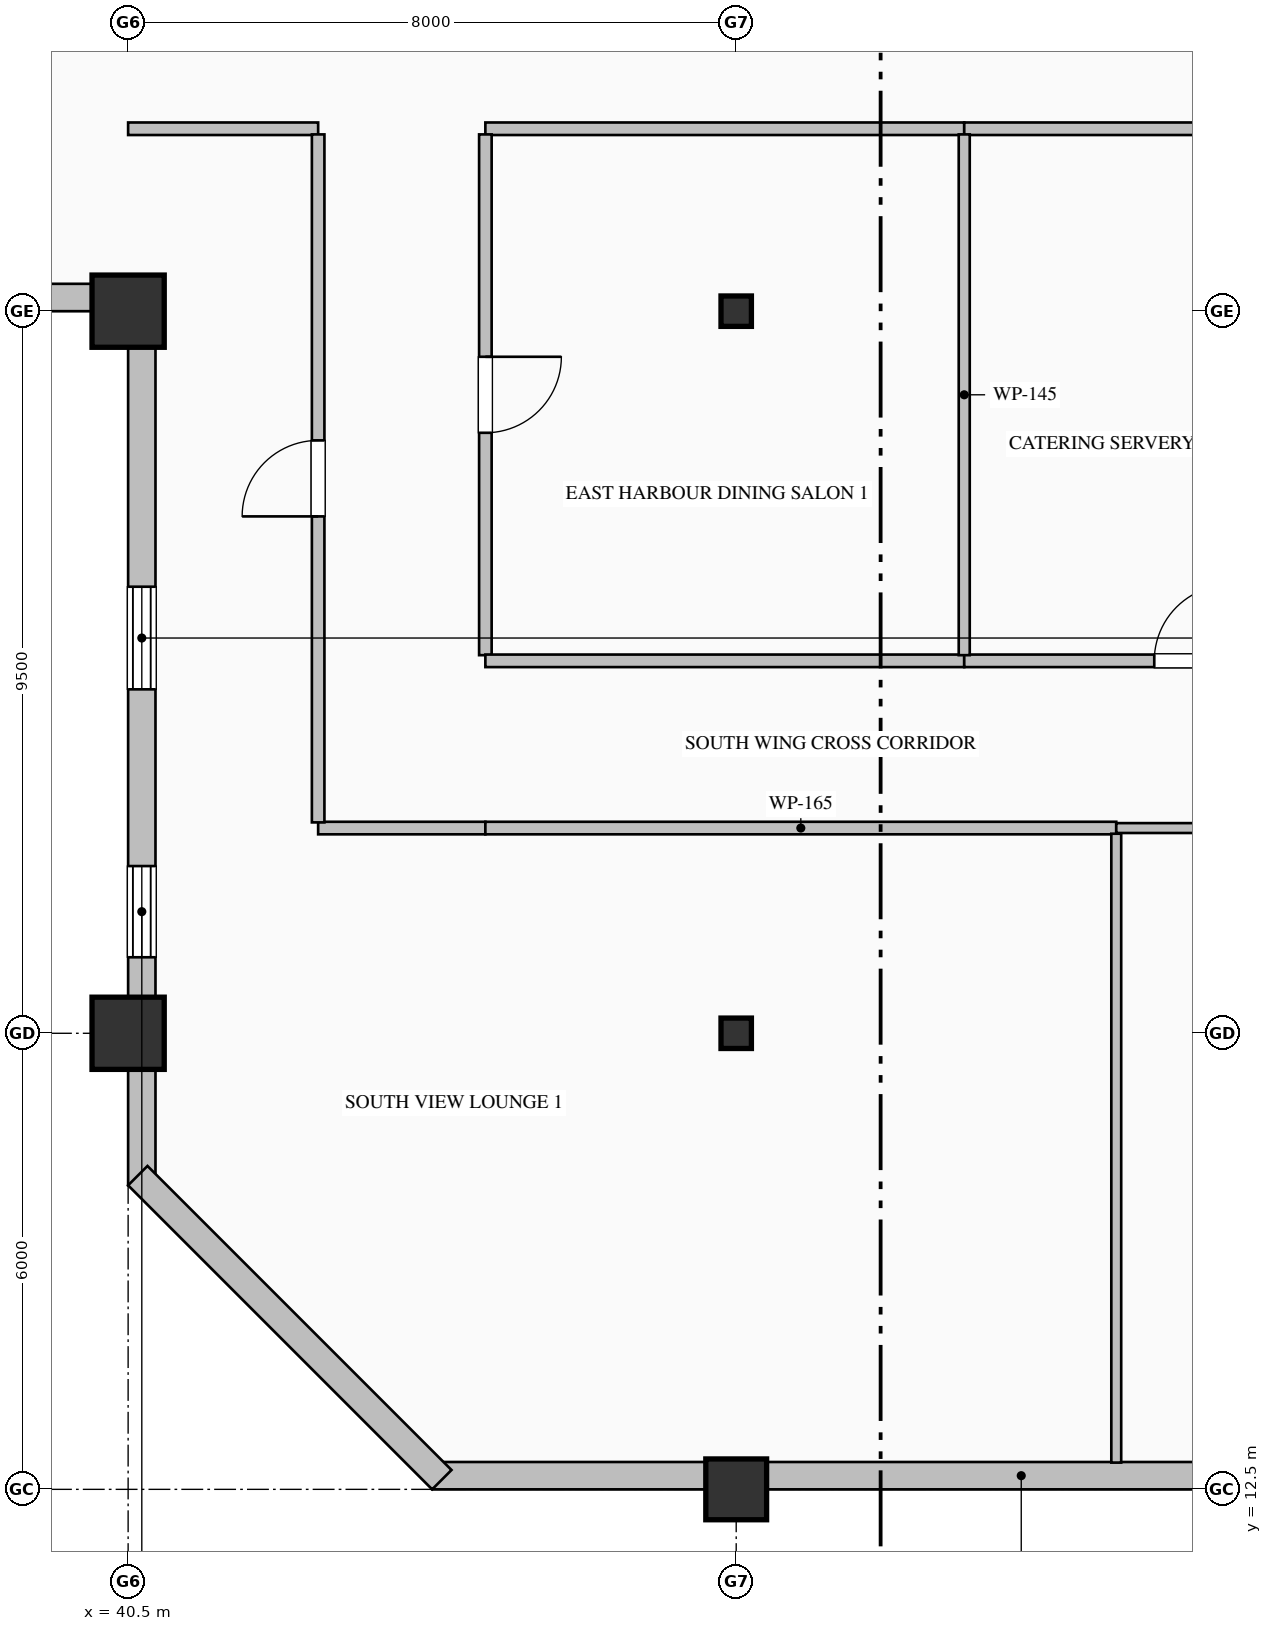
"""IFC4 building model, lengths in metres.
Left out: names, types, materials, properties, quantities, classifications, styles, units other than length and angle.
Written with IfcOpenShell. Run it as: python <this file> out.ifc"""

import sys

from ifc_helpers import new_model, si_unit, direction, frame, frame_2d, origin, origin_2d, place, context, subcontext, project, spatial, rectangle, hollow_rectangle, i_section, extrude, element, fill, save


model = new_model("IFC4")
c1 = context("Model", 3, precision=1e-05, world=origin(), true_north=direction((0.0, 1.0)))
c2 = subcontext(c1, "Body", "Model", "MODEL_VIEW")
j1 = project(units=[si_unit("LENGTHUNIT", "METRE"), si_unit("PLANEANGLEUNIT", "RADIAN")], contexts=[c1])
p1 = place(None, origin())
s1 = spatial("IfcSite", under=j1, at=p1, CompositionType="ELEMENT")
p2 = place(p1, origin())
s2 = spatial("IfcBuilding", under=s1, at=p2, CompositionType="ELEMENT")
p3 = place(p2, frame((0.0, 0.0, 249.8)))
s3 = spatial("IfcBuildingStorey", under=s2, at=p3, CompositionType="ELEMENT", Elevation=249.8)
for number, where, z_axis, x_axis in (
    (1, (40.5, 18.5, 0.0), (0.0, 0.0, 1.0), (1.0, 0.0, 0.0)),
    (2, (40.5, 28.0, 0.0), (0.0, 0.0, 1.0), (1.0, 0.0, 0.0)),
):
    element("IfcColumn", number, at=place(p3, frame(where, z_axis=z_axis, x_axis=x_axis)), inside=s3, PredefinedType="COLUMN", context=c2, shape_type="SweptSolid", body=[
        extrude(hollow_rectangle(XDim=0.95, YDim=0.95, WallThickness=0.036, at=origin_2d()), origin(), (0.0, 0.0, 1.0), 4.0),
    ])
p4 = place(p3, frame((48.5, 12.5, 0.0), z_axis=(0.0, 0.0, 1.0), x_axis=(1.0, 0.0, 0.0)))
e3 = element("IfcColumn", 3, at=p4, inside=s3, PredefinedType="COLUMN", context=c2, shape_type="SweptSolid", body=[
    extrude(hollow_rectangle(XDim=0.8, YDim=0.8, WallThickness=0.032, at=origin_2d()), origin(), (0.0, 0.0, 1.0), 4.0),
])
for number, where, z_axis, x_axis in (
    (4, (48.5, 18.5, 0.0), (0.0, 0.0, 1.0), (1.0, 0.0, 0.0)),
    (5, (48.5, 28.0, 0.0), (0.0, 0.0, 1.0), (1.0, 0.0, 0.0)),
):
    element("IfcColumn", number, at=place(p3, frame(where, z_axis=z_axis, x_axis=x_axis)), inside=s3, PredefinedType="COLUMN", context=c2, shape_type="SweptSolid", body=[
        extrude(i_section(OverallWidth=0.4, OverallDepth=0.4, WebThickness=0.013, FlangeThickness=0.021, FilletRadius=0.022, at=origin_2d()), origin(), (0.0, 0.0, 1.0), 4.0),
    ])
p5 = place(p3, frame((40.68, 16.5, 0.0), z_axis=(0.0, 0.0, 1.0), x_axis=(0.0, 1.0, 0.0)))
e6 = element("IfcWall", 6, at=p5, inside=s3, PredefinedType="SOLIDWALL", context=c2, shape_type="SweptSolid", body=[
    extrude(rectangle(XDim=11.86, YDim=0.36, at=frame_2d((5.93, 0.0))), origin(), (0.0, 0.0, 1.0), 3.187),
])
p6 = place(p5, frame((3.0, 0.0, 0.9)))
e7 = element("IfcOpeningElement", 7, at=p6, cuts=e6, PredefinedType="OPENING", context=c2, shape_type="SweptSolid", body=[
    extrude(rectangle(XDim=1.2, YDim=1.85, at=frame_2d((0.6, 0.925))), frame((0.0, 0.19, 0.0), z_axis=(0.0, -1.0, 0.0), x_axis=(1.0, 0.0, 0.0)), (0.0, 0.0, 1.0), 0.38),
])
p7 = place(p5, frame((6.525, 0.0, 0.9)))
e8 = element("IfcOpeningElement", 8, at=p7, cuts=e6, PredefinedType="OPENING", context=c2, shape_type="SweptSolid", body=[
    extrude(rectangle(XDim=1.35, YDim=1.85, at=frame_2d((0.675, 0.925))), frame((0.0, 0.19, 0.0), z_axis=(0.0, -1.0, 0.0), x_axis=(1.0, 0.0, 0.0)), (0.0, 0.0, 1.0), 0.38),
])
p8 = place(p3, frame((40.52, 28.18, 0.0), z_axis=(0.0, 0.0, 1.0), x_axis=(-1.0, 0.0, 0.0)))
e9 = element("IfcWall", 9, at=p8, inside=s3, PredefinedType="SOLIDWALL", context=c2, shape_type="SweptSolid", body=[
    extrude(rectangle(XDim=27.52, YDim=0.36, at=frame_2d((13.76, 0.0))), origin(), (0.0, 0.0, 1.0), 3.187),
])
p9 = place(p8, frame((10.2, 0.0, 0.9)))
e10 = element("IfcOpeningElement", 10, at=p9, cuts=e9, PredefinedType="OPENING", context=c2, shape_type="SweptSolid", body=[
    extrude(rectangle(XDim=1.2, YDim=1.85, at=frame_2d((0.6, 0.925))), frame((0.0, 0.19, 0.0), z_axis=(0.0, -1.0, 0.0), x_axis=(1.0, 0.0, 0.0)), (0.0, 0.0, 1.0), 0.38),
])
p10 = place(p8, frame((13.725, 0.0, 0.9)))
e11 = element("IfcOpeningElement", 11, at=p10, cuts=e9, PredefinedType="OPENING", context=c2, shape_type="SweptSolid", body=[
    extrude(rectangle(XDim=1.35, YDim=1.85, at=frame_2d((0.675, 0.925))), frame((0.0, 0.19, 0.0), z_axis=(0.0, -1.0, 0.0), x_axis=(1.0, 0.0, 0.0)), (0.0, 0.0, 1.0), 0.38),
])
p11 = place(p8, frame((17.4, 0.0, 0.7)))
e12 = element("IfcOpeningElement", 12, at=p11, cuts=e9, PredefinedType="OPENING", context=c2, shape_type="SweptSolid", body=[
    extrude(rectangle(XDim=1.2, YDim=1.85, at=frame_2d((0.6, 0.925))), frame((0.0, 0.19, 0.0), z_axis=(0.0, -1.0, 0.0), x_axis=(1.0, 0.0, 0.0)), (0.0, 0.0, 1.0), 0.38),
])
p12 = place(p8, frame((21.0, 0.0, 0.9)))
e13 = element("IfcOpeningElement", 13, at=p12, cuts=e9, PredefinedType="OPENING", context=c2, shape_type="SweptSolid", body=[
    extrude(rectangle(XDim=1.2, YDim=1.85, at=frame_2d((0.6, 0.925))), frame((0.0, 0.19, 0.0), z_axis=(0.0, -1.0, 0.0), x_axis=(1.0, 0.0, 0.0)), (0.0, 0.0, 1.0), 0.38),
])
p13 = place(p3, frame((60.0, 12.68, 0.0), z_axis=(0.0, 0.0, 1.0), x_axis=(-1.0, 0.0, 0.0)))
e14 = element("IfcWall", 14, at=p13, inside=s3, PredefinedType="SOLIDWALL", context=c2, shape_type="SweptSolid", body=[
    extrude(rectangle(XDim=15.5, YDim=0.36, at=frame_2d((7.75, 0.0))), origin(), (0.0, 0.0, 1.0), 3.325),
])
p14 = place(p3, frame((44.627, 12.627, 0.0), z_axis=(0.0, 0.0, 1.0), x_axis=(-0.707106781187, 0.707106781187, 0.0)))
e15 = element("IfcWall", 15, at=p14, inside=s3, PredefinedType="SOLIDWALL", context=c2, shape_type="SweptSolid", body=[
    extrude(rectangle(XDim=5.657, YDim=0.36, at=frame_2d((2.828, 0.0))), origin(), (0.0, 0.0, 1.0), 3.775),
])
p15 = place(p3, frame((51.5, 30.4, 0.0), z_axis=(0.0, 0.0, 1.0), x_axis=(-1.0, 0.0, 0.0)))
e16 = element("IfcWall", 16, at=p15, inside=s3, PredefinedType="PARTITIONING", context=c2, shape_type="SweptSolid", body=[
    extrude(rectangle(XDim=6.3, YDim=0.165, at=frame_2d((3.15, 0.0))), origin(), (0.0, 0.0, 1.0), 3.775),
])
p16 = place(p3, frame((56.5, 30.4, 0.0), z_axis=(0.0, 0.0, 1.0), x_axis=(-1.0, 0.0, 0.0)))
e17 = element("IfcWall", 17, at=p16, inside=s3, PredefinedType="PARTITIONING", context=c2, shape_type="SweptSolid", body=[
    extrude(rectangle(XDim=5.0, YDim=0.165, at=frame_2d((2.5, 0.0))), origin(), (0.0, 0.0, 1.0), 3.775),
])
p17 = place(p3, frame((43.0, 30.4, 0.0), z_axis=(0.0, 0.0, 1.0), x_axis=(-1.0, 0.0, 0.0)))
e18 = element("IfcWall", 18, at=p17, inside=s3, PredefinedType="PARTITIONING", context=c2, shape_type="SweptSolid", body=[
    extrude(rectangle(XDim=2.5, YDim=0.165, at=frame_2d((1.25, 0.0))), origin(), (0.0, 0.0, 1.0), 3.775),
])
p18 = place(p3, frame((45.2, 30.325, 0.0), z_axis=(0.0, 0.0, 1.0), x_axis=(0.0, -1.0, 0.0)))
e19 = element("IfcWall", 19, at=p18, inside=s3, PredefinedType="PARTITIONING", context=c2, shape_type="SweptSolid", body=[
    extrude(rectangle(XDim=6.851, YDim=0.165, at=frame_2d((3.425, 0.0))), origin(), (0.0, 0.0, 1.0), 3.775),
])
p19 = place(p18, frame((2.926, 0.0, 0.0)))
e20 = element("IfcOpeningElement", 20, at=p19, cuts=e19, PredefinedType="OPENING", context=c2, shape_type="SweptSolid", body=[
    extrude(rectangle(XDim=1.0, YDim=2.15, at=frame_2d((0.5, 1.075))), frame((0.0, 0.093, 0.0), z_axis=(0.0, -1.0, 0.0), x_axis=(1.0, 0.0, 0.0)), (0.0, 0.0, 1.0), 0.185),
])
p20 = place(p3, frame((45.2, 21.2, 0.0), z_axis=(0.0, 0.0, 1.0), x_axis=(-1.0, 0.0, 0.0)))
e21 = element("IfcWall", 21, at=p20, inside=s3, PredefinedType="PARTITIONING", context=c2, shape_type="SweptSolid", body=[
    extrude(rectangle(XDim=2.2, YDim=0.165, at=frame_2d((1.1, 0.0))), origin(), (0.0, 0.0, 1.0), 3.775),
])
p21 = place(p3, frame((43.0, 21.274, 0.0), z_axis=(0.0, 0.0, 1.0), x_axis=(0.0, 1.0, 0.0)))
e22 = element("IfcWall", 22, at=p21, inside=s3, PredefinedType="PARTITIONING", context=c2, shape_type="SweptSolid", body=[
    extrude(rectangle(XDim=9.051, YDim=0.165, at=frame_2d((4.525, 0.0))), origin(), (0.0, 0.0, 1.0), 3.775),
])
p22 = place(p21, frame((4.025, 0.0, 0.0)))
e23 = element("IfcOpeningElement", 23, at=p22, cuts=e22, PredefinedType="OPENING", context=c2, shape_type="SweptSolid", body=[
    extrude(rectangle(XDim=1.0, YDim=2.15, at=frame_2d((0.5, 1.075))), frame((0.0, 0.093, 0.0), z_axis=(0.0, -1.0, 0.0), x_axis=(1.0, 0.0, 0.0)), (0.0, 0.0, 1.0), 0.185),
])
p23 = place(p3, frame((45.2, 23.4, 0.0), z_axis=(0.0, 0.0, 1.0), x_axis=(1.0, 0.0, 0.0)))
e24 = element("IfcWall", 24, at=p23, inside=s3, PredefinedType="PARTITIONING", context=c2, shape_type="SweptSolid", body=[
    extrude(rectangle(XDim=6.3, YDim=0.165, at=frame_2d((3.15, 0.0))), origin(), (0.0, 0.0, 1.0), 3.467),
])
p24 = place(p3, frame((51.5, 23.4, 0.0), z_axis=(0.0, 0.0, 1.0), x_axis=(1.0, 0.0, 0.0)))
e25 = element("IfcWall", 25, at=p24, inside=s3, PredefinedType="PARTITIONING", context=c2, shape_type="SweptSolid", body=[
    extrude(rectangle(XDim=6.0, YDim=0.165, at=frame_2d((3.0, 0.0))), origin(), (0.0, 0.0, 1.0), 3.467),
])
p25 = place(p24, frame((2.5, 0.0, 0.0)))
e26 = element("IfcOpeningElement", 26, at=p25, cuts=e25, PredefinedType="OPENING", context=c2, shape_type="SweptSolid", body=[
    extrude(rectangle(XDim=1.0, YDim=2.15, at=frame_2d((0.5, 1.075))), frame((0.0, 0.093, 0.0), z_axis=(0.0, -1.0, 0.0), x_axis=(1.0, 0.0, 0.0)), (0.0, 0.0, 1.0), 0.185),
])
p26 = place(p3, frame((53.5, 21.2, 0.0), z_axis=(0.0, 0.0, 1.0), x_axis=(-1.0, 0.0, 0.0)))
e27 = element("IfcWall", 27, at=p26, inside=s3, PredefinedType="PARTITIONING", context=c2, shape_type="SweptSolid", body=[
    extrude(rectangle(XDim=8.3, YDim=0.165, at=frame_2d((4.15, 0.0))), origin(), (0.0, 0.0, 1.0), 3.775),
])
p27 = place(p3, frame((58.0, 21.2, 0.0), z_axis=(0.0, 0.0, 1.0), x_axis=(-1.0, 0.0, 0.0)))
e28 = element("IfcWall", 28, at=p27, inside=s3, PredefinedType="PARTITIONING", context=c2, shape_type="SweptSolid", body=[
    extrude(rectangle(XDim=4.5, YDim=0.13, at=frame_2d((2.25, 0.0))), origin(), (0.0, 0.0, 1.0), 3.775),
])
p28 = place(p27, frame((1.75, 0.0, 0.0)))
e29 = element("IfcOpeningElement", 29, at=p28, cuts=e28, PredefinedType="OPENING", context=c2, shape_type="SweptSolid", body=[
    extrude(rectangle(XDim=1.0, YDim=2.15, at=frame_2d((0.5, 1.075))), frame((0.0, 0.075, 0.0), z_axis=(0.0, -1.0, 0.0), x_axis=(1.0, 0.0, 0.0)), (0.0, 0.0, 1.0), 0.15),
])
p29 = place(p3, frame((51.5, 30.325, 0.0), z_axis=(0.0, 0.0, 1.0), x_axis=(0.0, -1.0, 0.0)))
e30 = element("IfcWall", 30, at=p29, inside=s3, PredefinedType="PARTITIONING", context=c2, shape_type="SweptSolid", body=[
    extrude(rectangle(XDim=6.851, YDim=0.145, at=frame_2d((3.425, 0.0))), origin(), (0.0, 0.0, 1.0), 3.775),
])
p30 = place(p3, frame((53.5, 21.125, 0.0), z_axis=(0.0, 0.0, 1.0), x_axis=(0.0, -1.0, 0.0)))
e31 = element("IfcWall", 31, at=p30, inside=s3, PredefinedType="PARTITIONING", context=c2, shape_type="SweptSolid", body=[
    extrude(rectangle(XDim=8.273, YDim=0.13, at=frame_2d((4.137, 0.0))), origin(), (0.0, 0.0, 1.0), 3.775),
])
p31 = place(p6, origin())
e32 = element("IfcWindow", 32, at=p31, inside=s3, PartitioningType="DOUBLE_PANEL_VERTICAL", PredefinedType="WINDOW", context=c2, shape_type="SweptSolid", body=[
    extrude(rectangle(XDim=1.2, YDim=1.85, at=frame_2d((0.6, 0.925))), frame((0.0, 0.15, 0.0), z_axis=(0.0, -1.0, 0.0), x_axis=(1.0, 0.0, 0.0)), (0.0, 0.0, 1.0), 0.06),
])
fill(e7, e32)
p32 = place(p7, origin())
e33 = element("IfcWindow", 33, at=p32, inside=s3, PartitioningType="DOUBLE_PANEL_VERTICAL", PredefinedType="WINDOW", context=c2, shape_type="SweptSolid", body=[
    extrude(rectangle(XDim=1.35, YDim=1.85, at=frame_2d((0.675, 0.925))), frame((0.0, 0.15, 0.0), z_axis=(0.0, -1.0, 0.0), x_axis=(1.0, 0.0, 0.0)), (0.0, 0.0, 1.0), 0.06),
])
fill(e8, e33)
p33 = place(p19, origin())
e34 = element("IfcDoor", 34, at=p33, inside=s3, OperationType="SINGLE_SWING_LEFT", PredefinedType="DOOR", context=c2, shape_type="SweptSolid", body=[
    extrude(rectangle(XDim=1.0, YDim=2.15, at=frame_2d((0.5, 1.075))), frame((0.0, 0.025, 0.0), z_axis=(0.0, -1.0, 0.0), x_axis=(1.0, 0.0, 0.0)), (0.0, 0.0, 1.0), 0.05),
])
fill(e20, e34)
p34 = place(p25, origin())
e35 = element("IfcDoor", 35, at=p34, inside=s3, OperationType="SINGLE_SWING_RIGHT", PredefinedType="DOOR", context=c2, shape_type="SweptSolid", body=[
    extrude(rectangle(XDim=1.0, YDim=2.15, at=frame_2d((0.5, 1.075))), frame((0.0, 0.025, 0.0), z_axis=(0.0, -1.0, 0.0), x_axis=(1.0, 0.0, 0.0)), (0.0, 0.0, 1.0), 0.05),
])
fill(e26, e35)
p35 = place(p22, origin())
e36 = element("IfcDoor", 36, at=p35, inside=s3, OperationType="SINGLE_SWING_LEFT", PredefinedType="DOOR", context=c2, shape_type="SweptSolid", body=[
    extrude(rectangle(XDim=1.0, YDim=2.15, at=frame_2d((0.5, 1.075))), frame((0.0, 0.025, 0.0), z_axis=(0.0, -1.0, 0.0), x_axis=(1.0, 0.0, 0.0)), (0.0, 0.0, 1.0), 0.05),
])
fill(e23, e36)
save(model, sys.argv[1])
